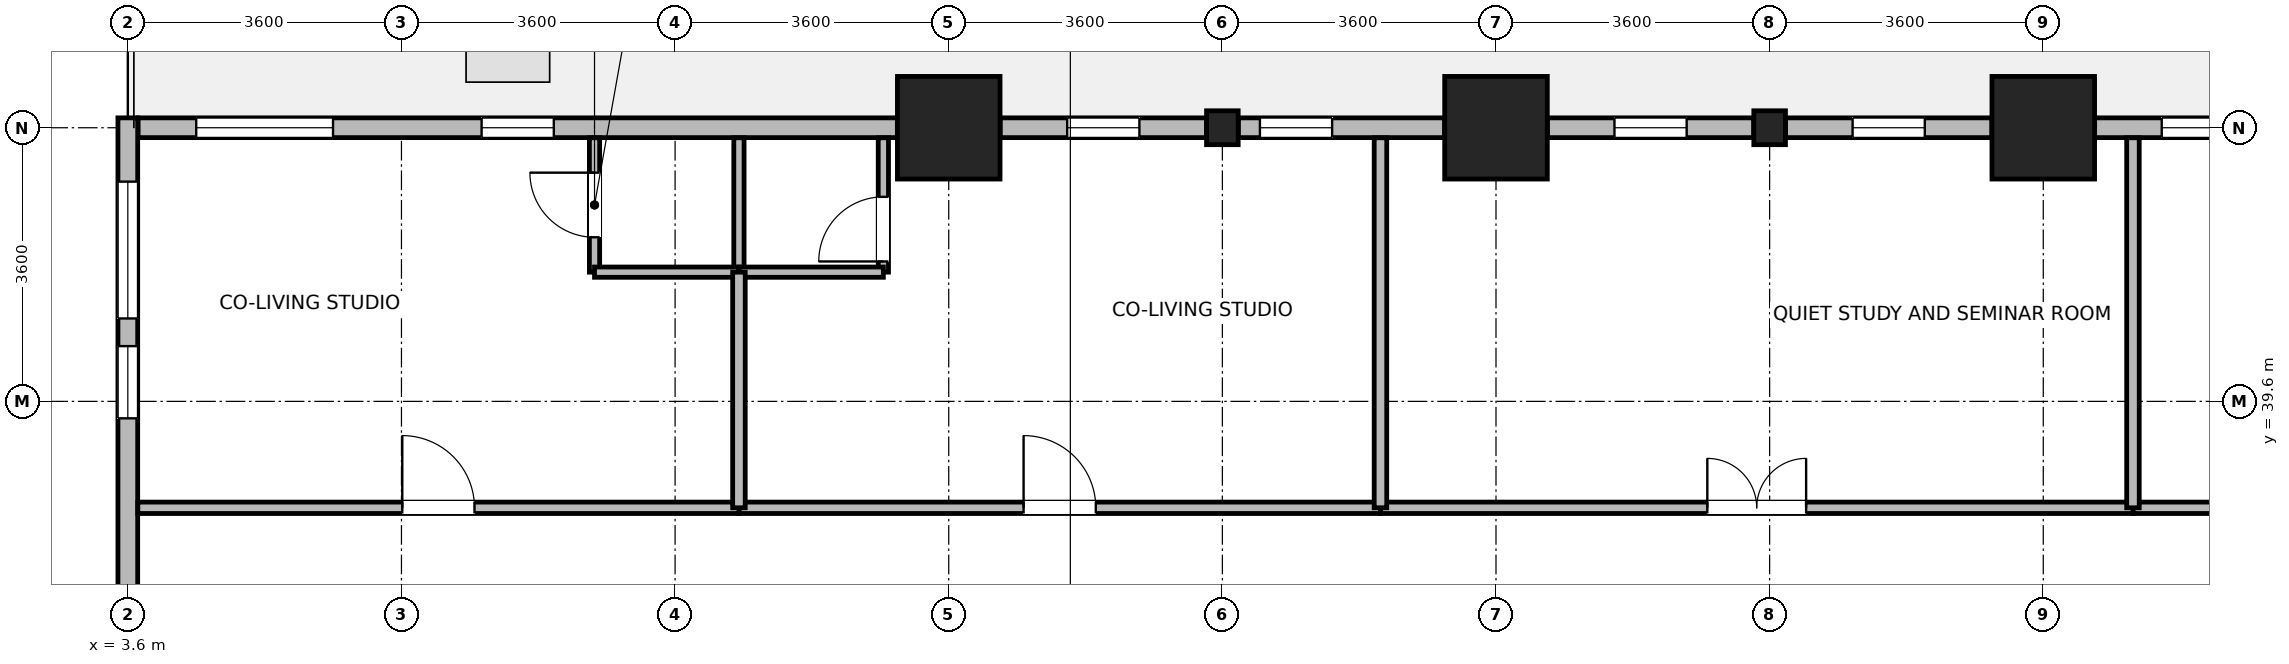
"""IFC4 building model, lengths in metres.
Left out: names, types, materials, properties, quantities, classifications, styles, units other than length and angle.
Written with IfcOpenShell. Run it as: python <this file> out.ifc"""

import sys

from ifc_helpers import new_model, si_unit, direction, frame, frame_2d, origin, origin_2d, place, context, subcontext, project, spatial, rectangle, i_section, extrude, source, transform, mapped, element, fill, save


model = new_model("IFC4")
c1 = context("Model", 3, precision=1e-05, world=origin(), true_north=direction((0.0, 1.0)))
c2 = subcontext(c1, "Body", "Model", "MODEL_VIEW")
j1 = project(units=[si_unit("LENGTHUNIT", "METRE"), si_unit("PLANEANGLEUNIT", "RADIAN")], contexts=[c1])
p1 = place(None, origin())
s1 = spatial("IfcSite", under=j1, at=p1, CompositionType="ELEMENT")
p2 = place(p1, origin())
s2 = spatial("IfcBuilding", under=s1, at=p2, CompositionType="ELEMENT")
p3 = place(p2, frame((0.0, 0.0, 43.8)))
s3 = spatial("IfcBuildingStorey", under=s2, at=p3, CompositionType="ELEMENT", Elevation=43.8)
m1 = source(origin(), c2, "Body", "SweptSolid", [
    extrude(rectangle(XDim=1.35, YDim=1.35, at=origin_2d()), origin(), (0.0, 0.0, 1.0), 3.7),
])
for number, where, z_axis, x_axis in (
    (1, (14.4, 43.2, 0.0), (0.0, 0.0, 1.0), (1.0, 0.0, 0.0)),
    (2, (21.6, 43.2, 0.0), (0.0, 0.0, 1.0), (1.0, 0.0, 0.0)),
    (3, (28.8, 43.2, 0.0), (0.0, 0.0, 1.0), (1.0, 0.0, 0.0)),
):
    element("IfcColumn", number, at=place(p3, frame(where, z_axis=z_axis, x_axis=x_axis)), inside=s3, PredefinedType="COLUMN", context=c2, shape_type="MappedRepresentation", body=[
        mapped(m1, transform((0.0, 0.0, 0.0), x_axis=(1.0, 0.0, 0.0), y_axis=(0.0, 1.0, 0.0), z_axis=(0.0, 0.0, 1.0), scale=1.0)),
    ])
m2 = source(origin(), c2, "Body", "SweptSolid", [
    extrude(i_section(OverallWidth=0.416, OverallDepth=0.446, WebThickness=0.029, FlangeThickness=0.04, FilletRadius=0.015, at=origin_2d()), origin(), (0.0, 0.0, 1.0), 3.7),
])
for number, where, z_axis, x_axis in (
    (4, (18.0, 43.2, 0.0), (0.0, 0.0, 1.0), (1.0, 0.0, 0.0)),
    (5, (25.2, 43.2, 0.0), (0.0, 0.0, 1.0), (1.0, 0.0, 0.0)),
):
    element("IfcColumn", number, at=place(p3, frame(where, z_axis=z_axis, x_axis=x_axis)), inside=s3, PredefinedType="COLUMN", context=c2, shape_type="MappedRepresentation", body=[
        mapped(m2, transform((0.0, 0.0, 0.0), x_axis=(1.0, 0.0, 0.0), y_axis=(0.0, 1.0, 0.0), z_axis=(0.0, 0.0, 1.0), scale=1.0)),
    ])
p4 = place(p3, frame((29.476, 43.2, 0.0), z_axis=(0.0, 0.0, 1.0), x_axis=(1.0, 0.0, 0.0)))
e6 = element("IfcWall", 6, at=p4, inside=s3, PredefinedType="STANDARD", context=c2, shape_type="SweptSolid", body=[
    extrude(rectangle(XDim=2.715, YDim=0.26, at=frame_2d((1.357, 0.0))), origin(), (0.0, 0.0, 1.0), 2.93),
])
p5 = place(p4, frame((0.883, 0.0, 0.85)))
e7 = element("IfcOpeningElement", 7, at=p5, cuts=e6, PredefinedType="OPENING", context=c2, shape_type="SweptSolid", body=[
    extrude(rectangle(XDim=0.95, YDim=1.75, at=frame_2d((0.475, 0.875))), frame((0.0, 0.14, 0.0), z_axis=(0.0, -1.0, 0.0), x_axis=(1.0, 0.0, 0.0)), (0.0, 0.0, 1.0), 0.28),
])
p6 = place(p3, frame((25.409, 43.2, 0.0), z_axis=(0.0, 0.0, 1.0), x_axis=(1.0, 0.0, 0.0)))
e8 = element("IfcWall", 8, at=p6, inside=s3, PredefinedType="STANDARD", context=c2, shape_type="SweptSolid", body=[
    extrude(rectangle(XDim=2.715, YDim=0.26, at=frame_2d((1.357, 0.0))), origin(), (0.0, 0.0, 1.0), 2.93),
])
p7 = place(p6, frame((0.883, 0.0, 0.85)))
e9 = element("IfcOpeningElement", 9, at=p7, cuts=e8, PredefinedType="OPENING", context=c2, shape_type="SweptSolid", body=[
    extrude(rectangle(XDim=0.95, YDim=1.75, at=frame_2d((0.475, 0.875))), frame((0.0, 0.14, 0.0), z_axis=(0.0, -1.0, 0.0), x_axis=(1.0, 0.0, 0.0)), (0.0, 0.0, 1.0), 0.28),
])
p8 = place(p3, frame((22.276, 43.2, 0.0), z_axis=(0.0, 0.0, 1.0), x_axis=(1.0, 0.0, 0.0)))
e10 = element("IfcWall", 10, at=p8, inside=s3, PredefinedType="STANDARD", context=c2, shape_type="SweptSolid", body=[
    extrude(rectangle(XDim=2.715, YDim=0.26, at=frame_2d((1.357, 0.0))), origin(), (0.0, 0.0, 1.0), 2.93),
])
p9 = place(p8, frame((0.883, 0.0, 0.85)))
e11 = element("IfcOpeningElement", 11, at=p9, cuts=e10, PredefinedType="OPENING", context=c2, shape_type="SweptSolid", body=[
    extrude(rectangle(XDim=0.95, YDim=1.75, at=frame_2d((0.475, 0.875))), frame((0.0, 0.14, 0.0), z_axis=(0.0, -1.0, 0.0), x_axis=(1.0, 0.0, 0.0)), (0.0, 0.0, 1.0), 0.28),
])
p10 = place(p3, frame((18.209, 43.2, 0.0), z_axis=(0.0, 0.0, 1.0), x_axis=(1.0, 0.0, 0.0)))
e12 = element("IfcWall", 12, at=p10, inside=s3, PredefinedType="STANDARD", context=c2, shape_type="SweptSolid", body=[
    extrude(rectangle(XDim=2.715, YDim=0.26, at=frame_2d((1.357, 0.0))), origin(), (0.0, 0.0, 1.0), 2.93),
])
p11 = place(p10, frame((0.285, 0.0, 0.85)))
e13 = element("IfcOpeningElement", 13, at=p11, cuts=e12, PredefinedType="OPENING", context=c2, shape_type="SweptSolid", body=[
    extrude(rectangle(XDim=0.95, YDim=1.75, at=frame_2d((0.475, 0.875))), frame((0.0, 0.14, 0.0), z_axis=(0.0, -1.0, 0.0), x_axis=(1.0, 0.0, 0.0)), (0.0, 0.0, 1.0), 0.28),
])
p12 = place(p3, frame((15.076, 43.2, 0.0), z_axis=(0.0, 0.0, 1.0), x_axis=(1.0, 0.0, 0.0)))
e14 = element("IfcWall", 14, at=p12, inside=s3, PredefinedType="STANDARD", context=c2, shape_type="SweptSolid", body=[
    extrude(rectangle(XDim=2.715, YDim=0.26, at=frame_2d((1.357, 0.0))), origin(), (0.0, 0.0, 1.0), 2.93),
])
p13 = place(p12, frame((0.883, 0.0, 0.85)))
e15 = element("IfcOpeningElement", 15, at=p13, cuts=e14, PredefinedType="OPENING", context=c2, shape_type="SweptSolid", body=[
    extrude(rectangle(XDim=0.95, YDim=1.75, at=frame_2d((0.475, 0.875))), frame((0.0, 0.14, 0.0), z_axis=(0.0, -1.0, 0.0), x_axis=(1.0, 0.0, 0.0)), (0.0, 0.0, 1.0), 0.28),
])
p14 = place(p3, frame((3.735, 43.2, 0.0), z_axis=(0.0, 0.0, 1.0), x_axis=(1.0, 0.0, 0.0)))
e16 = element("IfcWall", 16, at=p14, inside=s3, PredefinedType="STANDARD", context=c2, shape_type="SweptSolid", body=[
    extrude(rectangle(XDim=9.989, YDim=0.26, at=frame_2d((4.995, 0.0))), origin(), (0.0, 0.0, 1.0), 3.43),
])
p15 = place(p14, frame((0.765, 0.0, 0.85)))
e17 = element("IfcOpeningElement", 17, at=p15, cuts=e16, PredefinedType="OPENING", context=c2, shape_type="SweptSolid", body=[
    extrude(rectangle(XDim=1.8, YDim=1.85, at=frame_2d((0.9, 0.925))), frame((0.0, 0.14, 0.0), z_axis=(0.0, -1.0, 0.0), x_axis=(1.0, 0.0, 0.0)), (0.0, 0.0, 1.0), 0.28),
])
p16 = place(p14, frame((4.52, 0.0, 0.85)))
e18 = element("IfcOpeningElement", 18, at=p16, cuts=e16, PredefinedType="OPENING", context=c2, shape_type="SweptSolid", body=[
    extrude(rectangle(XDim=0.95, YDim=1.75, at=frame_2d((0.475, 0.875))), frame((0.0, 0.14, 0.0), z_axis=(0.0, -1.0, 0.0), x_axis=(1.0, 0.0, 0.0)), (0.0, 0.0, 1.0), 0.28),
])
p17 = place(p3, frame((3.6, 36.374, 0.0), z_axis=(0.0, 0.0, 1.0), x_axis=(0.0, 1.0, 0.0)))
e19 = element("IfcWall", 19, at=p17, inside=s3, PredefinedType="STANDARD", context=c2, shape_type="SweptSolid", body=[
    extrude(rectangle(XDim=6.956, YDim=0.26, at=frame_2d((3.478, 0.0))), origin(), (0.0, 0.0, 1.0), 3.43),
])
p18 = place(p17, frame((4.317, 0.0, 0.85)))
e20 = element("IfcOpeningElement", 20, at=p18, cuts=e19, PredefinedType="OPENING", context=c2, shape_type="SweptSolid", body=[
    extrude(rectangle(XDim=1.8, YDim=1.85, at=frame_2d((0.9, 0.925))), frame((0.0, 0.14, 0.0), z_axis=(0.0, -1.0, 0.0), x_axis=(1.0, 0.0, 0.0)), (0.0, 0.0, 1.0), 0.28),
])
p19 = place(p17, frame((3.003, 0.0, 0.85)))
e21 = element("IfcOpeningElement", 21, at=p19, cuts=e19, PredefinedType="OPENING", context=c2, shape_type="SweptSolid", body=[
    extrude(rectangle(XDim=0.95, YDim=1.75, at=frame_2d((0.475, 0.875))), frame((0.0, 0.14, 0.0), z_axis=(0.0, -1.0, 0.0), x_axis=(1.0, 0.0, 0.0)), (0.0, 0.0, 1.0), 0.28),
])
p20 = place(p3, frame((9.74, 41.3, 0.0), z_axis=(0.0, 0.0, 1.0), x_axis=(0.0, 1.0, 0.0)))
e22 = element("IfcWall", 22, at=p20, inside=s3, PredefinedType="PARTITIONING", context=c2, shape_type="SweptSolid", body=[
    extrude(rectangle(XDim=1.768, YDim=0.135, at=frame_2d((0.884, 0.0))), origin(), (0.0, 0.0, 1.0), 3.43),
])
p21 = place(p20, frame((0.459, 0.0, 0.0)))
e23 = element("IfcOpeningElement", 23, at=p21, cuts=e22, PredefinedType="OPENING", context=c2, shape_type="SweptSolid", body=[
    extrude(rectangle(XDim=0.85, YDim=2.04, at=frame_2d((0.425, 1.02))), frame((0.0, 0.078, 0.0), z_axis=(0.0, -1.0, 0.0), x_axis=(1.0, 0.0, 0.0)), (0.0, 0.0, 1.0), 0.155),
])
p22 = place(p3, frame((11.64, 41.3, 0.0), z_axis=(0.0, 0.0, 1.0), x_axis=(0.0, 1.0, 0.0)))
e24 = element("IfcWall", 24, at=p22, inside=s3, PredefinedType="PARTITIONING", context=c2, shape_type="SweptSolid", body=[
    extrude(rectangle(XDim=1.768, YDim=0.135, at=frame_2d((0.884, 0.0))), origin(), (0.0, 0.0, 1.0), 3.43),
])
p23 = place(p3, frame((13.54, 41.3, 0.0), z_axis=(0.0, 0.0, 1.0), x_axis=(0.0, 1.0, 0.0)))
e25 = element("IfcWall", 25, at=p23, inside=s3, PredefinedType="PARTITIONING", context=c2, shape_type="SweptSolid", body=[
    extrude(rectangle(XDim=1.768, YDim=0.135, at=frame_2d((0.884, 0.0))), origin(), (0.0, 0.0, 1.0), 3.43),
])
p24 = place(p23, frame((0.141, 0.0, 0.0)))
e26 = element("IfcOpeningElement", 26, at=p24, cuts=e25, PredefinedType="OPENING", context=c2, shape_type="SweptSolid", body=[
    extrude(rectangle(XDim=0.85, YDim=2.04, at=frame_2d((0.425, 1.02))), frame((0.0, 0.078, 0.0), z_axis=(0.0, -1.0, 0.0), x_axis=(1.0, 0.0, 0.0)), (0.0, 0.0, 1.0), 0.155),
])
p25 = place(p3, frame((9.74, 41.3, 0.0), z_axis=(0.0, 0.0, 1.0), x_axis=(1.0, 0.0, 0.0)))
e27 = element("IfcWall", 27, at=p25, inside=s3, PredefinedType="PARTITIONING", context=c2, shape_type="SweptSolid", body=[
    extrude(rectangle(XDim=1.9, YDim=0.135, at=frame_2d((0.95, 0.0))), origin(), (0.0, 0.0, 1.0), 3.43),
])
p26 = place(p3, frame((11.64, 41.3, 0.0), z_axis=(0.0, 0.0, 1.0), x_axis=(1.0, 0.0, 0.0)))
e28 = element("IfcWall", 28, at=p26, inside=s3, PredefinedType="PARTITIONING", context=c2, shape_type="SweptSolid", body=[
    extrude(rectangle(XDim=1.9, YDim=0.135, at=frame_2d((0.95, 0.0))), origin(), (0.0, 0.0, 1.0), 3.43),
])
p27 = place(p3, frame((29.98, 38.2, 0.0), z_axis=(0.0, 0.0, 1.0), x_axis=(1.0, 0.0, 0.0)))
e29 = element("IfcWall", 29, at=p27, inside=s3, PredefinedType="PARTITIONING", context=c2, shape_type="SweptSolid", body=[
    extrude(rectangle(XDim=11.44, YDim=0.15, at=frame_2d((5.72, 0.0))), origin(), (0.0, 0.0, 1.0), 3.43),
])
p28 = place(p27, frame((5.27, 0.0, 0.0)))
e30 = element("IfcOpeningElement", 30, at=p28, cuts=e29, PredefinedType="OPENING", context=c2, shape_type="SweptSolid", body=[
    extrude(rectangle(XDim=0.9, YDim=2.08, at=frame_2d((0.45, 1.04))), frame((0.0, 0.085, 0.0), z_axis=(0.0, -1.0, 0.0), x_axis=(1.0, 0.0, 0.0)), (0.0, 0.0, 1.0), 0.17),
])
p29 = place(p3, frame((20.08, 38.2, 0.0), z_axis=(0.0, 0.0, 1.0), x_axis=(1.0, 0.0, 0.0)))
e31 = element("IfcWall", 31, at=p29, inside=s3, PredefinedType="PARTITIONING", context=c2, shape_type="SweptSolid", body=[
    extrude(rectangle(XDim=9.9, YDim=0.15, at=frame_2d((4.95, 0.0))), origin(), (0.0, 0.0, 1.0), 3.43),
])
p30 = place(p29, frame((4.3, 0.0, 0.0)))
e32 = element("IfcOpeningElement", 32, at=p30, cuts=e31, PredefinedType="OPENING", context=c2, shape_type="SweptSolid", body=[
    extrude(rectangle(XDim=1.3, YDim=2.12, at=frame_2d((0.65, 1.06))), frame((0.0, 0.085, 0.0), z_axis=(0.0, -1.0, 0.0), x_axis=(1.0, 0.0, 0.0)), (0.0, 0.0, 1.0), 0.17),
])
p31 = place(p3, frame((11.64, 38.2, 0.0), z_axis=(0.0, 0.0, 1.0), x_axis=(1.0, 0.0, 0.0)))
e33 = element("IfcWall", 33, at=p31, inside=s3, PredefinedType="PARTITIONING", context=c2, shape_type="SweptSolid", body=[
    extrude(rectangle(XDim=8.44, YDim=0.15, at=frame_2d((4.22, 0.0))), origin(), (0.0, 0.0, 1.0), 3.43),
])
p32 = place(p31, frame((3.745, 0.0, 0.0)))
e34 = element("IfcOpeningElement", 34, at=p32, cuts=e33, PredefinedType="OPENING", context=c2, shape_type="SweptSolid", body=[
    extrude(rectangle(XDim=0.95, YDim=2.1, at=frame_2d((0.475, 1.05))), frame((0.0, 0.085, 0.0), z_axis=(0.0, -1.0, 0.0), x_axis=(1.0, 0.0, 0.0)), (0.0, 0.0, 1.0), 0.17),
])
p33 = place(p3, frame((3.732, 38.2, 0.0), z_axis=(0.0, 0.0, 1.0), x_axis=(1.0, 0.0, 0.0)))
e35 = element("IfcWall", 35, at=p33, inside=s3, PredefinedType="PARTITIONING", context=c2, shape_type="SweptSolid", body=[
    extrude(rectangle(XDim=7.908, YDim=0.15, at=frame_2d((3.954, 0.0))), origin(), (0.0, 0.0, 1.0), 3.43),
])
p34 = place(p33, frame((3.479, 0.0, 0.0)))
e36 = element("IfcOpeningElement", 36, at=p34, cuts=e35, PredefinedType="OPENING", context=c2, shape_type="SweptSolid", body=[
    extrude(rectangle(XDim=0.95, YDim=2.1, at=frame_2d((0.475, 1.05))), frame((0.0, 0.085, 0.0), z_axis=(0.0, -1.0, 0.0), x_axis=(1.0, 0.0, 0.0)), (0.0, 0.0, 1.0), 0.17),
])
for number, where, z_axis, x_axis in (
    (37, (20.08, 38.2, 0.0), (0.0, 0.0, 1.0), (0.0, 1.0, 0.0)),
    (38, (29.98, 38.2, 0.0), (0.0, 0.0, 1.0), (0.0, 1.0, 0.0)),
):
    element("IfcWall", number, at=place(p3, frame(where, z_axis=z_axis, x_axis=x_axis)), inside=s3, PredefinedType="PARTITIONING", context=c2, shape_type="SweptSolid", body=[
        extrude(rectangle(XDim=4.868, YDim=0.165, at=frame_2d((2.434, 0.0))), origin(), (0.0, 0.0, 1.0), 3.43),
    ])
p35 = place(p3, frame((11.64, 38.2, 0.0), z_axis=(0.0, 0.0, 1.0), x_axis=(0.0, 1.0, 0.0)))
e39 = element("IfcWall", 39, at=p35, inside=s3, PredefinedType="PARTITIONING", context=c2, shape_type="SweptSolid", body=[
    extrude(rectangle(XDim=3.1, YDim=0.165, at=frame_2d((1.55, 0.0))), origin(), (0.0, 0.0, 1.0), 3.43),
])
p36 = place(p5, origin())
e40 = element("IfcWindow", 40, at=p36, inside=s3, PartitioningType="SINGLE_PANEL", PredefinedType="WINDOW", context=c2, shape_type="SweptSolid", body=[
    extrude(rectangle(XDim=0.95, YDim=1.75, at=frame_2d((0.475, 0.875))), frame((0.0, 0.03, 0.0), z_axis=(0.0, -1.0, 0.0), x_axis=(1.0, 0.0, 0.0)), (0.0, 0.0, 1.0), 0.06),
])
fill(e7, e40)
p37 = place(p7, origin())
e41 = element("IfcWindow", 41, at=p37, inside=s3, PartitioningType="SINGLE_PANEL", PredefinedType="WINDOW", context=c2, shape_type="SweptSolid", body=[
    extrude(rectangle(XDim=0.95, YDim=1.75, at=frame_2d((0.475, 0.875))), frame((0.0, 0.03, 0.0), z_axis=(0.0, -1.0, 0.0), x_axis=(1.0, 0.0, 0.0)), (0.0, 0.0, 1.0), 0.06),
])
fill(e9, e41)
p38 = place(p9, origin())
e42 = element("IfcWindow", 42, at=p38, inside=s3, PartitioningType="SINGLE_PANEL", PredefinedType="WINDOW", context=c2, shape_type="SweptSolid", body=[
    extrude(rectangle(XDim=0.95, YDim=1.75, at=frame_2d((0.475, 0.875))), frame((0.0, 0.03, 0.0), z_axis=(0.0, -1.0, 0.0), x_axis=(1.0, 0.0, 0.0)), (0.0, 0.0, 1.0), 0.06),
])
fill(e11, e42)
p39 = place(p11, origin())
e43 = element("IfcWindow", 43, at=p39, inside=s3, PartitioningType="SINGLE_PANEL", PredefinedType="WINDOW", context=c2, shape_type="SweptSolid", body=[
    extrude(rectangle(XDim=0.95, YDim=1.75, at=frame_2d((0.475, 0.875))), frame((0.0, 0.03, 0.0), z_axis=(0.0, -1.0, 0.0), x_axis=(1.0, 0.0, 0.0)), (0.0, 0.0, 1.0), 0.06),
])
fill(e13, e43)
p40 = place(p13, origin())
e44 = element("IfcWindow", 44, at=p40, inside=s3, PartitioningType="SINGLE_PANEL", PredefinedType="WINDOW", context=c2, shape_type="SweptSolid", body=[
    extrude(rectangle(XDim=0.95, YDim=1.75, at=frame_2d((0.475, 0.875))), frame((0.0, 0.03, 0.0), z_axis=(0.0, -1.0, 0.0), x_axis=(1.0, 0.0, 0.0)), (0.0, 0.0, 1.0), 0.06),
])
fill(e15, e44)
p41 = place(p15, origin())
e45 = element("IfcWindow", 45, at=p41, inside=s3, PartitioningType="SINGLE_PANEL", PredefinedType="WINDOW", context=c2, shape_type="SweptSolid", body=[
    extrude(rectangle(XDim=1.8, YDim=1.85, at=frame_2d((0.9, 0.925))), frame((0.0, 0.03, 0.0), z_axis=(0.0, -1.0, 0.0), x_axis=(1.0, 0.0, 0.0)), (0.0, 0.0, 1.0), 0.06),
])
fill(e17, e45)
p42 = place(p16, origin())
e46 = element("IfcWindow", 46, at=p42, inside=s3, PartitioningType="SINGLE_PANEL", PredefinedType="WINDOW", context=c2, shape_type="SweptSolid", body=[
    extrude(rectangle(XDim=0.95, YDim=1.75, at=frame_2d((0.475, 0.875))), frame((0.0, 0.03, 0.0), z_axis=(0.0, -1.0, 0.0), x_axis=(1.0, 0.0, 0.0)), (0.0, 0.0, 1.0), 0.06),
])
fill(e18, e46)
p43 = place(p18, origin())
e47 = element("IfcWindow", 47, at=p43, inside=s3, PartitioningType="SINGLE_PANEL", PredefinedType="WINDOW", context=c2, shape_type="SweptSolid", body=[
    extrude(rectangle(XDim=1.8, YDim=1.85, at=frame_2d((0.9, 0.925))), frame((0.0, 0.03, 0.0), z_axis=(0.0, -1.0, 0.0), x_axis=(1.0, 0.0, 0.0)), (0.0, 0.0, 1.0), 0.06),
])
fill(e20, e47)
p44 = place(p19, origin())
e48 = element("IfcWindow", 48, at=p44, inside=s3, PartitioningType="SINGLE_PANEL", PredefinedType="WINDOW", context=c2, shape_type="SweptSolid", body=[
    extrude(rectangle(XDim=0.95, YDim=1.75, at=frame_2d((0.475, 0.875))), frame((0.0, 0.03, 0.0), z_axis=(0.0, -1.0, 0.0), x_axis=(1.0, 0.0, 0.0)), (0.0, 0.0, 1.0), 0.06),
])
fill(e21, e48)
p45 = place(p21, origin())
e49 = element("IfcDoor", 49, at=p45, inside=s3, OperationType="SINGLE_SWING_RIGHT", PredefinedType="DOOR", context=c2, shape_type="SweptSolid", body=[
    extrude(rectangle(XDim=0.85, YDim=2.04, at=frame_2d((0.425, 1.02))), frame((0.0, 0.025, 0.0), z_axis=(0.0, -1.0, 0.0), x_axis=(1.0, 0.0, 0.0)), (0.0, 0.0, 1.0), 0.05),
])
fill(e23, e49)
p46 = place(p24, origin())
e50 = element("IfcDoor", 50, at=p46, inside=s3, OperationType="SINGLE_SWING_LEFT", PredefinedType="DOOR", context=c2, shape_type="SweptSolid", body=[
    extrude(rectangle(XDim=0.85, YDim=2.04, at=frame_2d((0.425, 1.02))), frame((0.0, 0.025, 0.0), z_axis=(0.0, -1.0, 0.0), x_axis=(1.0, 0.0, 0.0)), (0.0, 0.0, 1.0), 0.05),
])
fill(e26, e50)
p47 = place(p30, origin())
e51 = element("IfcDoor", 51, at=p47, inside=s3, OperationType="DOUBLE_DOOR_SINGLE_SWING", PredefinedType="DOOR", context=c2, shape_type="SweptSolid", body=[
    extrude(rectangle(XDim=1.3, YDim=2.12, at=frame_2d((0.65, 1.06))), frame((0.0, 0.025, 0.0), z_axis=(0.0, -1.0, 0.0), x_axis=(1.0, 0.0, 0.0)), (0.0, 0.0, 1.0), 0.05),
])
fill(e32, e51)
p48 = place(p32, origin())
e52 = element("IfcDoor", 52, at=p48, inside=s3, OperationType="SINGLE_SWING_LEFT", PredefinedType="DOOR", context=c2, shape_type="SweptSolid", body=[
    extrude(rectangle(XDim=0.95, YDim=2.1, at=frame_2d((0.475, 1.05))), frame((0.0, 0.025, 0.0), z_axis=(0.0, -1.0, 0.0), x_axis=(1.0, 0.0, 0.0)), (0.0, 0.0, 1.0), 0.05),
])
fill(e34, e52)
p49 = place(p34, origin())
e53 = element("IfcDoor", 53, at=p49, inside=s3, OperationType="SINGLE_SWING_LEFT", PredefinedType="DOOR", context=c2, shape_type="SweptSolid", body=[
    extrude(rectangle(XDim=0.95, YDim=2.1, at=frame_2d((0.475, 1.05))), frame((0.0, 0.025, 0.0), z_axis=(0.0, -1.0, 0.0), x_axis=(1.0, 0.0, 0.0)), (0.0, 0.0, 1.0), 0.05),
])
fill(e36, e53)
save(model, sys.argv[1])
